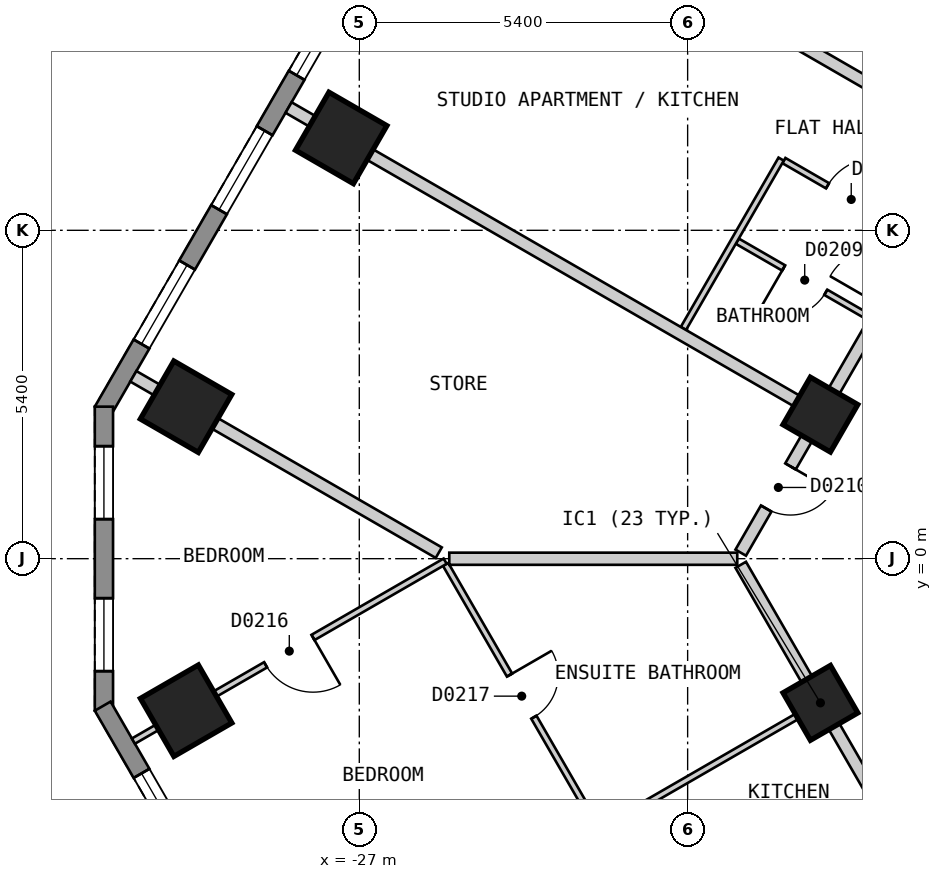
"""IFC4 building model, lengths in metres.
Left out: names, types, materials, properties, quantities, classifications, styles, units other than length and angle.
Written with IfcOpenShell. Run it as: python <this file> out.ifc"""

import sys

from ifc_helpers import new_model, si_unit, direction, frame, frame_2d, origin, origin_2d, place, context, subcontext, project, spatial, polyline, rectangle, outline, extrude, element, fill, save


model = new_model("IFC4")
c1 = context("Model", 3, precision=1e-05, world=origin(), true_north=direction((0.0, 1.0)))
c2 = subcontext(c1, "Body", "Model", "MODEL_VIEW")
j1 = project(units=[si_unit("LENGTHUNIT", "METRE"), si_unit("PLANEANGLEUNIT", "RADIAN")], contexts=[c1])
p1 = place(None, origin())
s1 = spatial("IfcSite", under=j1, at=p1, CompositionType="ELEMENT")
p2 = place(p1, origin())
s2 = spatial("IfcBuilding", under=s1, at=p2, CompositionType="ELEMENT")
p3 = place(p2, frame((0.0, 0.0, 47.4)))
s3 = spatial("IfcBuildingStorey", under=s2, at=p3, CompositionType="ELEMENT", Elevation=47.4)
for number, where, z_axis, x_axis in (
    (1, (-27.298, 6.919, 0.0), (0.0, 0.0, 1.0), (-0.5, -0.866, 0.0)),
    (2, (-29.849, 2.499, 0.0), (0.0, 0.0, 1.0), (-0.5, -0.866, 0.0)),
    (3, (-29.848, -2.5, 0.0), (0.0, 0.0, 1.0), (0.5, -0.866, 0.0)),
):
    element("IfcColumn", number, at=place(p3, frame(where, z_axis=z_axis, x_axis=x_axis)), inside=s3, PredefinedType="COLUMN", context=c2, shape_type="SweptSolid", body=[
        extrude(rectangle(XDim=1.1, YDim=1.1, at=origin_2d()), origin(), (0.0, 0.0, 1.0), 3.0),
    ])
for number, where, z_axis, x_axis in (
    (4, (-19.416, -2.371, 0.0), (0.0, 0.0, 1.0), (0.5, -0.866, 0.0)),
    (5, (-19.417, 2.369, 0.0), (0.0, 0.0, 1.0), (-0.5, -0.866, 0.0)),
):
    element("IfcColumn", number, at=place(p3, frame(where, z_axis=z_axis, x_axis=x_axis)), inside=s3, PredefinedType="COLUMN", context=c2, shape_type="SweptSolid", body=[
        extrude(rectangle(XDim=0.9, YDim=0.9, at=origin_2d()), origin(), (0.0, 0.0, 1.0), 3.0),
    ])
p4 = place(p3, frame((-17.71, 25.825, 0.0), z_axis=(0.0, 0.0, 1.0), x_axis=(-0.500001938803, -0.866024284413, 0.0)))
e6 = element("IfcWall", 6, at=p4, inside=s3, PredefinedType="SOLIDWALL", context=c2, shape_type="SweptSolid", body=[
    extrude(outline(polyline([(0.0, -0.15), (27.02, -0.15), (26.94, 0.15), (0.08, 0.15), (0.0, -0.15)])), origin(), (0.0, 0.0, 1.0), 2.7),
])
p5 = place(p4, frame((1.277, 0.0, 0.15)))
e7 = element("IfcOpeningElement", 7, at=p5, cuts=e6, PredefinedType="OPENING", context=c2, shape_type="SweptSolid", body=[
    extrude(rectangle(XDim=1.5, YDim=2.1, at=frame_2d((0.75, 1.05))), frame((0.0, 0.16, 0.0), z_axis=(0.0, -1.0, 0.0), x_axis=(1.0, 0.0, 0.0)), (0.0, 0.0, 1.0), 0.32),
])
p6 = place(p4, frame((3.829, 0.0, 0.15)))
e8 = element("IfcOpeningElement", 8, at=p6, cuts=e6, PredefinedType="OPENING", context=c2, shape_type="SweptSolid", body=[
    extrude(rectangle(XDim=1.5, YDim=2.1, at=frame_2d((0.75, 1.05))), frame((0.0, 0.16, 0.0), z_axis=(0.0, -1.0, 0.0), x_axis=(1.0, 0.0, 0.0)), (0.0, 0.0, 1.0), 0.32),
])
p7 = place(p4, frame((6.382, 0.0, 0.15)))
e9 = element("IfcOpeningElement", 9, at=p7, cuts=e6, PredefinedType="OPENING", context=c2, shape_type="SweptSolid", body=[
    extrude(rectangle(XDim=1.5, YDim=2.1, at=frame_2d((0.75, 1.05))), frame((0.0, 0.16, 0.0), z_axis=(0.0, -1.0, 0.0), x_axis=(1.0, 0.0, 0.0)), (0.0, 0.0, 1.0), 0.32),
])
p8 = place(p4, frame((8.933, 0.0, 0.15)))
e10 = element("IfcOpeningElement", 10, at=p8, cuts=e6, PredefinedType="OPENING", context=c2, shape_type="SweptSolid", body=[
    extrude(rectangle(XDim=1.5, YDim=2.1, at=frame_2d((0.75, 1.05))), frame((0.0, 0.16, 0.0), z_axis=(0.0, -1.0, 0.0), x_axis=(1.0, 0.0, 0.0)), (0.0, 0.0, 1.0), 0.32),
])
p9 = place(p4, frame((11.485, 0.0, 0.15)))
e11 = element("IfcOpeningElement", 11, at=p9, cuts=e6, PredefinedType="OPENING", context=c2, shape_type="SweptSolid", body=[
    extrude(rectangle(XDim=1.5, YDim=2.1, at=frame_2d((0.75, 1.05))), frame((0.0, 0.16, 0.0), z_axis=(0.0, -1.0, 0.0), x_axis=(1.0, 0.0, 0.0)), (0.0, 0.0, 1.0), 0.32),
])
p10 = place(p4, frame((14.037, 0.0, 0.15)))
e12 = element("IfcOpeningElement", 12, at=p10, cuts=e6, PredefinedType="OPENING", context=c2, shape_type="SweptSolid", body=[
    extrude(rectangle(XDim=1.5, YDim=2.1, at=frame_2d((0.75, 1.05))), frame((0.0, 0.16, 0.0), z_axis=(0.0, -1.0, 0.0), x_axis=(1.0, 0.0, 0.0)), (0.0, 0.0, 1.0), 0.32),
])
p11 = place(p4, frame((16.589, 0.0, 0.15)))
e13 = element("IfcOpeningElement", 13, at=p11, cuts=e6, PredefinedType="OPENING", context=c2, shape_type="SweptSolid", body=[
    extrude(rectangle(XDim=1.5, YDim=2.1, at=frame_2d((0.75, 1.05))), frame((0.0, 0.16, 0.0), z_axis=(0.0, -1.0, 0.0), x_axis=(1.0, 0.0, 0.0)), (0.0, 0.0, 1.0), 0.32),
])
p12 = place(p4, frame((19.141, 0.0, 0.15)))
e14 = element("IfcOpeningElement", 14, at=p12, cuts=e6, PredefinedType="OPENING", context=c2, shape_type="SweptSolid", body=[
    extrude(rectangle(XDim=1.5, YDim=2.1, at=frame_2d((0.75, 1.05))), frame((0.0, 0.16, 0.0), z_axis=(0.0, -1.0, 0.0), x_axis=(1.0, 0.0, 0.0)), (0.0, 0.0, 1.0), 0.32),
])
p13 = place(p4, frame((21.693, 0.0, 0.15)))
e15 = element("IfcOpeningElement", 15, at=p13, cuts=e6, PredefinedType="OPENING", context=c2, shape_type="SweptSolid", body=[
    extrude(rectangle(XDim=1.5, YDim=2.1, at=frame_2d((0.75, 1.05))), frame((0.0, 0.16, 0.0), z_axis=(0.0, -1.0, 0.0), x_axis=(1.0, 0.0, 0.0)), (0.0, 0.0, 1.0), 0.32),
])
p14 = place(p4, frame((24.244, 0.0, 0.15)))
e16 = element("IfcOpeningElement", 16, at=p14, cuts=e6, PredefinedType="OPENING", context=c2, shape_type="SweptSolid", body=[
    extrude(rectangle(XDim=1.5, YDim=2.1, at=frame_2d((0.75, 1.05))), frame((0.0, 0.16, 0.0), z_axis=(0.0, -1.0, 0.0), x_axis=(1.0, 0.0, 0.0)), (0.0, 0.0, 1.0), 0.32),
])
p15 = place(p3, frame((-31.2, 2.5, 0.0), z_axis=(0.0, 0.0, 1.0), x_axis=(0.0, -1.0, 0.0)))
e17 = element("IfcWall", 17, at=p15, inside=s3, PredefinedType="SOLIDWALL", context=c2, shape_type="SweptSolid", body=[
    extrude(outline(polyline([(0.0, -0.15), (5.0, -0.15), (4.92, 0.15), (0.08, 0.15), (0.0, -0.15)])), origin(), (0.0, 0.0, 1.0), 2.7),
])
p16 = place(p15, frame((0.65, 0.0, 0.15)))
e18 = element("IfcOpeningElement", 18, at=p16, cuts=e17, PredefinedType="OPENING", context=c2, shape_type="SweptSolid", body=[
    extrude(rectangle(XDim=1.2, YDim=2.1, at=frame_2d((0.6, 1.05))), frame((0.0, 0.16, 0.0), z_axis=(0.0, -1.0, 0.0), x_axis=(1.0, 0.0, 0.0)), (0.0, 0.0, 1.0), 0.32),
])
p17 = place(p15, frame((3.15, 0.0, 0.15)))
e19 = element("IfcOpeningElement", 19, at=p17, cuts=e17, PredefinedType="OPENING", context=c2, shape_type="SweptSolid", body=[
    extrude(rectangle(XDim=1.2, YDim=2.1, at=frame_2d((0.6, 1.05))), frame((0.0, 0.16, 0.0), z_axis=(0.0, -1.0, 0.0), x_axis=(1.0, 0.0, 0.0)), (0.0, 0.0, 1.0), 0.32),
])
p18 = place(p3, frame((-31.22, -2.425, 0.0), z_axis=(0.0, 0.0, 1.0), x_axis=(0.500001938803, -0.866024284413, 0.0)))
e20 = element("IfcWall", 20, at=p18, inside=s3, PredefinedType="SOLIDWALL", context=c2, shape_type="SweptSolid", body=[
    extrude(outline(polyline([(0.0, -0.15), (27.02, -0.15), (26.94, 0.15), (0.08, 0.15), (0.0, -0.15)])), origin(), (0.0, 0.0, 1.0), 2.7),
])
p19 = place(p18, frame((1.277, 0.0, 0.15)))
e21 = element("IfcOpeningElement", 21, at=p19, cuts=e20, PredefinedType="OPENING", context=c2, shape_type="SweptSolid", body=[
    extrude(rectangle(XDim=1.5, YDim=2.1, at=frame_2d((0.75, 1.05))), frame((0.0, 0.16, 0.0), z_axis=(0.0, -1.0, 0.0), x_axis=(1.0, 0.0, 0.0)), (0.0, 0.0, 1.0), 0.32),
])
p20 = place(p18, frame((3.829, 0.0, 0.15)))
e22 = element("IfcOpeningElement", 22, at=p20, cuts=e20, PredefinedType="OPENING", context=c2, shape_type="SweptSolid", body=[
    extrude(rectangle(XDim=1.5, YDim=2.1, at=frame_2d((0.75, 1.05))), frame((0.0, 0.16, 0.0), z_axis=(0.0, -1.0, 0.0), x_axis=(1.0, 0.0, 0.0)), (0.0, 0.0, 1.0), 0.32),
])
p21 = place(p18, frame((6.382, 0.0, 0.15)))
e23 = element("IfcOpeningElement", 23, at=p21, cuts=e20, PredefinedType="OPENING", context=c2, shape_type="SweptSolid", body=[
    extrude(rectangle(XDim=1.5, YDim=2.1, at=frame_2d((0.75, 1.05))), frame((0.0, 0.16, 0.0), z_axis=(0.0, -1.0, 0.0), x_axis=(1.0, 0.0, 0.0)), (0.0, 0.0, 1.0), 0.32),
])
p22 = place(p18, frame((8.933, 0.0, 0.15)))
e24 = element("IfcOpeningElement", 24, at=p22, cuts=e20, PredefinedType="OPENING", context=c2, shape_type="SweptSolid", body=[
    extrude(rectangle(XDim=1.5, YDim=2.1, at=frame_2d((0.75, 1.05))), frame((0.0, 0.16, 0.0), z_axis=(0.0, -1.0, 0.0), x_axis=(1.0, 0.0, 0.0)), (0.0, 0.0, 1.0), 0.32),
])
p23 = place(p18, frame((11.485, 0.0, 0.15)))
e25 = element("IfcOpeningElement", 25, at=p23, cuts=e20, PredefinedType="OPENING", context=c2, shape_type="SweptSolid", body=[
    extrude(rectangle(XDim=1.5, YDim=2.1, at=frame_2d((0.75, 1.05))), frame((0.0, 0.16, 0.0), z_axis=(0.0, -1.0, 0.0), x_axis=(1.0, 0.0, 0.0)), (0.0, 0.0, 1.0), 0.32),
])
p24 = place(p18, frame((14.037, 0.0, 0.15)))
e26 = element("IfcOpeningElement", 26, at=p24, cuts=e20, PredefinedType="OPENING", context=c2, shape_type="SweptSolid", body=[
    extrude(rectangle(XDim=1.5, YDim=2.1, at=frame_2d((0.75, 1.05))), frame((0.0, 0.16, 0.0), z_axis=(0.0, -1.0, 0.0), x_axis=(1.0, 0.0, 0.0)), (0.0, 0.0, 1.0), 0.32),
])
p25 = place(p18, frame((16.589, 0.0, 0.15)))
e27 = element("IfcOpeningElement", 27, at=p25, cuts=e20, PredefinedType="OPENING", context=c2, shape_type="SweptSolid", body=[
    extrude(rectangle(XDim=1.5, YDim=2.1, at=frame_2d((0.75, 1.05))), frame((0.0, 0.16, 0.0), z_axis=(0.0, -1.0, 0.0), x_axis=(1.0, 0.0, 0.0)), (0.0, 0.0, 1.0), 0.32),
])
p26 = place(p18, frame((19.141, 0.0, 0.15)))
e28 = element("IfcOpeningElement", 28, at=p26, cuts=e20, PredefinedType="OPENING", context=c2, shape_type="SweptSolid", body=[
    extrude(rectangle(XDim=1.5, YDim=2.1, at=frame_2d((0.75, 1.05))), frame((0.0, 0.16, 0.0), z_axis=(0.0, -1.0, 0.0), x_axis=(1.0, 0.0, 0.0)), (0.0, 0.0, 1.0), 0.32),
])
p27 = place(p18, frame((21.693, 0.0, 0.15)))
e29 = element("IfcOpeningElement", 29, at=p27, cuts=e20, PredefinedType="OPENING", context=c2, shape_type="SweptSolid", body=[
    extrude(rectangle(XDim=1.5, YDim=2.1, at=frame_2d((0.75, 1.05))), frame((0.0, 0.16, 0.0), z_axis=(0.0, -1.0, 0.0), x_axis=(1.0, 0.0, 0.0)), (0.0, 0.0, 1.0), 0.32),
])
p28 = place(p18, frame((24.244, 0.0, 0.15)))
e30 = element("IfcOpeningElement", 30, at=p28, cuts=e20, PredefinedType="OPENING", context=c2, shape_type="SweptSolid", body=[
    extrude(rectangle(XDim=1.5, YDim=2.1, at=frame_2d((0.75, 1.05))), frame((0.0, 0.16, 0.0), z_axis=(0.0, -1.0, 0.0), x_axis=(1.0, 0.0, 0.0)), (0.0, 0.0, 1.0), 0.32),
])
p29 = place(p3, frame((-20.727, -0.101, 0.0), z_axis=(0.0, 0.0, 1.0), x_axis=(0.500070814966, -0.865984514884, 0.0)))
e31 = element("IfcWall", 31, at=p29, inside=s3, PredefinedType="PARTITIONING", context=c2, shape_type="SweptSolid", body=[
    extrude(rectangle(XDim=7.239, YDim=0.2, at=frame_2d((3.62, 0.0))), origin(), (0.0, 0.0, 1.0), 2.7),
])
p30 = place(p29, frame((5.681, 0.0, 0.0)))
e32 = element("IfcOpeningElement", 32, at=p30, cuts=e31, PredefinedType="OPENING", context=c2, shape_type="SweptSolid", body=[
    extrude(rectangle(XDim=1.0, YDim=2.1, at=frame_2d((0.5, 1.05))), frame((0.0, 0.11, 0.0), z_axis=(0.0, -1.0, 0.0), x_axis=(1.0, 0.0, 0.0)), (0.0, 0.0, 1.0), 0.22),
])
p31 = place(p3, frame((-20.727, 0.099, 0.0), z_axis=(0.0, 0.0, 1.0), x_axis=(0.499993204491, 0.866029327138, 0.0)))
e33 = element("IfcWall", 33, at=p31, inside=s3, PredefinedType="PARTITIONING", context=c2, shape_type="SweptSolid", body=[
    extrude(rectangle(XDim=20.554, YDim=0.2, at=frame_2d((10.277, 0.0))), origin(), (0.0, 0.0, 1.0), 2.7),
])
p32 = place(p31, frame((14.88, 0.0, 0.0)))
e34 = element("IfcOpeningElement", 34, at=p32, cuts=e33, PredefinedType="OPENING", context=c2, shape_type="SweptSolid", body=[
    extrude(rectangle(XDim=1.0, YDim=2.1, at=frame_2d((0.5, 1.05))), frame((0.0, 0.11, 0.0), z_axis=(0.0, -1.0, 0.0), x_axis=(1.0, 0.0, 0.0)), (0.0, 0.0, 1.0), 0.22),
])
p33 = place(p31, frame((4.673, 0.0, 0.0)))
e35 = element("IfcOpeningElement", 35, at=p33, cuts=e33, PredefinedType="OPENING", context=c2, shape_type="SweptSolid", body=[
    extrude(rectangle(XDim=1.0, YDim=2.1, at=frame_2d((0.5, 1.05))), frame((0.0, 0.11, 0.0), z_axis=(0.0, -1.0, 0.0), x_axis=(1.0, 0.0, 0.0)), (0.0, 0.0, 1.0), 0.22),
])
p34 = place(p31, frame((0.838, 0.0, 0.0)))
e36 = element("IfcOpeningElement", 36, at=p34, cuts=e33, PredefinedType="OPENING", context=c2, shape_type="SweptSolid", body=[
    extrude(rectangle(XDim=0.8, YDim=2.1, at=frame_2d((0.4, 1.05))), frame((0.0, 0.11, 0.0), z_axis=(0.0, -1.0, 0.0), x_axis=(1.0, 0.0, 0.0)), (0.0, 0.0, 1.0), 0.22),
])
p35 = place(p3, frame((-25.58, -0.094, 0.0), z_axis=(0.0, 0.0, 1.0), x_axis=(0.500093258202, -0.865971554441, 0.0)))
e37 = element("IfcWall", 37, at=p35, inside=s3, PredefinedType="PARTITIONING", context=c2, shape_type="SweptSolid", body=[
    extrude(rectangle(XDim=5.053, YDim=0.1, at=frame_2d((2.527, 0.0))), origin(), (0.0, 0.0, 1.0), 2.7),
])
p36 = place(p35, frame((2.102, 0.0, 0.0)))
e38 = element("IfcOpeningElement", 38, at=p36, cuts=e37, PredefinedType="OPENING", context=c2, shape_type="SweptSolid", body=[
    extrude(rectangle(XDim=0.8, YDim=2.1, at=frame_2d((0.4, 1.05))), frame((0.0, 0.06, 0.0), z_axis=(0.0, -1.0, 0.0), x_axis=(1.0, 0.0, 0.0)), (0.0, 0.0, 1.0), 0.12),
])
p37 = place(p3, frame((-20.017, 6.547, 0.0), z_axis=(0.0, 0.0, 1.0), x_axis=(0.865940918122, -0.500146304917, 0.0)))
e39 = element("IfcWall", 39, at=p37, inside=s3, PredefinedType="PARTITIONING", context=c2, shape_type="SweptSolid", body=[
    extrude(rectangle(XDim=2.51, YDim=0.1, at=frame_2d((1.255, 0.0))), origin(), (0.0, 0.0, 1.0), 2.7),
])
p38 = place(p37, frame((0.829, 0.0, 0.0)))
e40 = element("IfcOpeningElement", 40, at=p38, cuts=e39, PredefinedType="OPENING", context=c2, shape_type="SweptSolid", body=[
    extrude(rectangle(XDim=0.9, YDim=2.1, at=frame_2d((0.45, 1.05))), frame((0.0, 0.06, 0.0), z_axis=(0.0, -1.0, 0.0), x_axis=(1.0, 0.0, 0.0)), (0.0, 0.0, 1.0), 0.12),
])
p39 = place(p3, frame((-20.783, 5.221, 0.0), z_axis=(0.0, 0.0, 1.0), x_axis=(0.865958718457, -0.500115484592, 0.0)))
e41 = element("IfcWall", 41, at=p39, inside=s3, PredefinedType="PARTITIONING", context=c2, shape_type="SweptSolid", body=[
    extrude(rectangle(XDim=2.509, YDim=0.1, at=frame_2d((1.255, 0.0))), origin(), (0.0, 0.0, 1.0), 2.7),
])
p40 = place(p39, frame((0.88, 0.0, 0.0)))
e42 = element("IfcOpeningElement", 42, at=p40, cuts=e41, PredefinedType="OPENING", context=c2, shape_type="SweptSolid", body=[
    extrude(rectangle(XDim=0.8, YDim=2.1, at=frame_2d((0.4, 1.05))), frame((0.0, 0.06, 0.0), z_axis=(0.0, -1.0, 0.0), x_axis=(1.0, 0.0, 0.0)), (0.0, 0.0, 1.0), 0.12),
])
p41 = place(p3, frame((-21.669, 3.787, 0.0), z_axis=(0.0, 0.0, 1.0), x_axis=(0.499913121084, 0.86607555754, 0.0)))
e43 = element("IfcWall", 43, at=p41, inside=s3, PredefinedType="PARTITIONING", context=c2, shape_type="SweptSolid", body=[
    extrude(rectangle(XDim=3.214, YDim=0.1, at=frame_2d((1.607, 0.0))), origin(), (0.0, 0.0, 1.0), 2.7),
])
p42 = place(p3, frame((-28.163, -7.42, 0.0), z_axis=(0.0, 0.0, 1.0), x_axis=(0.866065245018, 0.499930986609, 0.0)))
e44 = element("IfcWall", 44, at=p42, inside=s3, PredefinedType="PARTITIONING", context=c2, shape_type="SweptSolid", body=[
    extrude(rectangle(XDim=10.0, YDim=0.1, at=frame_2d((5.0, 0.0))), origin(), (0.0, 0.0, 1.0), 2.7),
])
p43 = place(p42, frame((2.5, 0.0, 0.0)))
e45 = element("IfcOpeningElement", 45, at=p43, cuts=e44, PredefinedType="OPENING", context=c2, shape_type="SweptSolid", body=[
    extrude(rectangle(XDim=0.9, YDim=2.1, at=frame_2d((0.45, 1.05))), frame((0.0, 0.06, 0.0), z_axis=(0.0, -1.0, 0.0), x_axis=(1.0, 0.0, 0.0)), (0.0, 0.0, 1.0), 0.12),
])
p44 = place(p3, frame((-30.715, -3.0, 0.0), z_axis=(0.0, 0.0, 1.0), x_axis=(0.866113484451, 0.499847408768, 0.0)))
e46 = element("IfcWall", 46, at=p44, inside=s3, PredefinedType="PARTITIONING", context=c2, shape_type="SweptSolid", body=[
    extrude(rectangle(XDim=5.92, YDim=0.1, at=frame_2d((2.96, 0.0))), origin(), (0.0, 0.0, 1.0), 2.7),
])
p45 = place(p44, frame((2.51, 0.0, 0.0)))
e47 = element("IfcOpeningElement", 47, at=p45, cuts=e46, PredefinedType="OPENING", context=c2, shape_type="SweptSolid", body=[
    extrude(rectangle(XDim=0.9, YDim=2.1, at=frame_2d((0.45, 1.05))), frame((0.0, 0.06, 0.0), z_axis=(0.0, -1.0, 0.0), x_axis=(1.0, 0.0, 0.0)), (0.0, 0.0, 1.0), 0.12),
])
p46 = place(p3, frame((-28.163, 7.419, 0.0), z_axis=(0.0, 0.0, 1.0), x_axis=(0.866022959057, -0.500004234368, 0.0)))
e48 = element("IfcWall", 48, at=p46, inside=s3, PredefinedType="PARTITIONING", context=c2, shape_type="SweptSolid", body=[
    extrude(rectangle(XDim=10.0, YDim=0.2, at=frame_2d((5.0, 0.0))), origin(), (0.0, 0.0, 1.0), 2.7),
])
p47 = place(p3, frame((-30.716, 2.999, 0.0), z_axis=(0.0, 0.0, 1.0), x_axis=(0.866032775405, -0.499987231761, 0.0)))
e49 = element("IfcWall", 49, at=p47, inside=s3, PredefinedType="PARTITIONING", context=c2, shape_type="SweptSolid", body=[
    extrude(rectangle(XDim=5.8, YDim=0.2, at=frame_2d((2.9, 0.0))), origin(), (0.0, 0.0, 1.0), 2.7),
])
p48 = place(p3, frame((-25.611, 11.839, 0.0), z_axis=(0.0, 0.0, 1.0), x_axis=(0.866022959057, -0.500004234368, 0.0)))
e50 = element("IfcWall", 50, at=p48, inside=s3, PredefinedType="PARTITIONING", context=c2, shape_type="SweptSolid", body=[
    extrude(rectangle(XDim=10.0, YDim=0.2, at=frame_2d((5.0, 0.0))), origin(), (0.0, 0.0, 1.0), 2.7),
])
p49 = place(p3, frame((-25.52, -0.001, 0.0), z_axis=(0.0, 0.0, 1.0), x_axis=(1.0, 0.0, 0.0)))
e51 = element("IfcWall", 51, at=p49, inside=s3, PredefinedType="PARTITIONING", context=c2, shape_type="SweptSolid", body=[
    extrude(rectangle(XDim=4.736, YDim=0.2, at=frame_2d((2.368, 0.0))), origin(), (0.0, 0.0, 1.0), 2.7),
])
p50 = place(p12, origin())
e52 = element("IfcWindow", 52, at=p50, inside=s3, PartitioningType="SINGLE_PANEL", PredefinedType="WINDOW", context=c2, shape_type="SweptSolid", body=[
    extrude(rectangle(XDim=1.5, YDim=2.1, at=frame_2d((0.75, 1.05))), frame((0.0, 0.03, 0.0), z_axis=(0.0, -1.0, 0.0), x_axis=(1.0, 0.0, 0.0)), (0.0, 0.0, 1.0), 0.06),
])
fill(e14, e52)
p51 = place(p13, origin())
e53 = element("IfcWindow", 53, at=p51, inside=s3, PartitioningType="SINGLE_PANEL", PredefinedType="WINDOW", context=c2, shape_type="SweptSolid", body=[
    extrude(rectangle(XDim=1.5, YDim=2.1, at=frame_2d((0.75, 1.05))), frame((0.0, 0.03, 0.0), z_axis=(0.0, -1.0, 0.0), x_axis=(1.0, 0.0, 0.0)), (0.0, 0.0, 1.0), 0.06),
])
fill(e15, e53)
p52 = place(p14, origin())
e54 = element("IfcWindow", 54, at=p52, inside=s3, PartitioningType="SINGLE_PANEL", PredefinedType="WINDOW", context=c2, shape_type="SweptSolid", body=[
    extrude(rectangle(XDim=1.5, YDim=2.1, at=frame_2d((0.75, 1.05))), frame((0.0, 0.03, 0.0), z_axis=(0.0, -1.0, 0.0), x_axis=(1.0, 0.0, 0.0)), (0.0, 0.0, 1.0), 0.06),
])
fill(e16, e54)
p53 = place(p16, origin())
e55 = element("IfcWindow", 55, at=p53, inside=s3, PartitioningType="SINGLE_PANEL", PredefinedType="WINDOW", context=c2, shape_type="SweptSolid", body=[
    extrude(rectangle(XDim=1.2, YDim=2.1, at=frame_2d((0.6, 1.05))), frame((0.0, 0.03, 0.0), z_axis=(0.0, -1.0, 0.0), x_axis=(1.0, 0.0, 0.0)), (0.0, 0.0, 1.0), 0.06),
])
fill(e18, e55)
p54 = place(p17, origin())
e56 = element("IfcWindow", 56, at=p54, inside=s3, PartitioningType="SINGLE_PANEL", PredefinedType="WINDOW", context=c2, shape_type="SweptSolid", body=[
    extrude(rectangle(XDim=1.2, YDim=2.1, at=frame_2d((0.6, 1.05))), frame((0.0, 0.03, 0.0), z_axis=(0.0, -1.0, 0.0), x_axis=(1.0, 0.0, 0.0)), (0.0, 0.0, 1.0), 0.06),
])
fill(e19, e56)
p55 = place(p19, origin())
e57 = element("IfcWindow", 57, at=p55, inside=s3, PartitioningType="SINGLE_PANEL", PredefinedType="WINDOW", context=c2, shape_type="SweptSolid", body=[
    extrude(rectangle(XDim=1.5, YDim=2.1, at=frame_2d((0.75, 1.05))), frame((0.0, 0.03, 0.0), z_axis=(0.0, -1.0, 0.0), x_axis=(1.0, 0.0, 0.0)), (0.0, 0.0, 1.0), 0.06),
])
fill(e21, e57)
p56 = place(p38, origin())
e58 = element("IfcDoor", 58, at=p56, inside=s3, OperationType="SINGLE_SWING_RIGHT", PredefinedType="DOOR", context=c2, shape_type="SweptSolid", body=[
    extrude(rectangle(XDim=0.9, YDim=2.1, at=frame_2d((0.45, 1.05))), frame((0.0, 0.025, 0.0), z_axis=(0.0, -1.0, 0.0), x_axis=(1.0, 0.0, 0.0)), (0.0, 0.0, 1.0), 0.05),
])
fill(e40, e58)
p57 = place(p40, origin())
e59 = element("IfcDoor", 59, at=p57, inside=s3, OperationType="SINGLE_SWING_LEFT", PredefinedType="DOOR", context=c2, shape_type="SweptSolid", body=[
    extrude(rectangle(XDim=0.8, YDim=2.1, at=frame_2d((0.4, 1.05))), frame((0.0, 0.025, 0.0), z_axis=(0.0, -1.0, 0.0), x_axis=(1.0, 0.0, 0.0)), (0.0, 0.0, 1.0), 0.05),
])
fill(e42, e59)
p58 = place(p34, origin())
e60 = element("IfcDoor", 60, at=p58, inside=s3, OperationType="SINGLE_SWING_RIGHT", PredefinedType="DOOR", context=c2, shape_type="SweptSolid", body=[
    extrude(rectangle(XDim=0.8, YDim=2.1, at=frame_2d((0.4, 1.05))), frame((0.0, 0.025, 0.0), z_axis=(0.0, -1.0, 0.0), x_axis=(1.0, 0.0, 0.0)), (0.0, 0.0, 1.0), 0.05),
])
fill(e36, e60)
p59 = place(p45, origin())
e61 = element("IfcDoor", 61, at=p59, inside=s3, OperationType="SINGLE_SWING_RIGHT", PredefinedType="DOOR", context=c2, shape_type="SweptSolid", body=[
    extrude(rectangle(XDim=0.9, YDim=2.1, at=frame_2d((0.45, 1.05))), frame((0.0, 0.025, 0.0), z_axis=(0.0, -1.0, 0.0), x_axis=(1.0, 0.0, 0.0)), (0.0, 0.0, 1.0), 0.05),
])
fill(e47, e61)
p60 = place(p36, origin())
e62 = element("IfcDoor", 62, at=p60, inside=s3, OperationType="SINGLE_SWING_LEFT", PredefinedType="DOOR", context=c2, shape_type="SweptSolid", body=[
    extrude(rectangle(XDim=0.8, YDim=2.1, at=frame_2d((0.4, 1.05))), frame((0.0, 0.025, 0.0), z_axis=(0.0, -1.0, 0.0), x_axis=(1.0, 0.0, 0.0)), (0.0, 0.0, 1.0), 0.05),
])
fill(e38, e62)
save(model, sys.argv[1])
